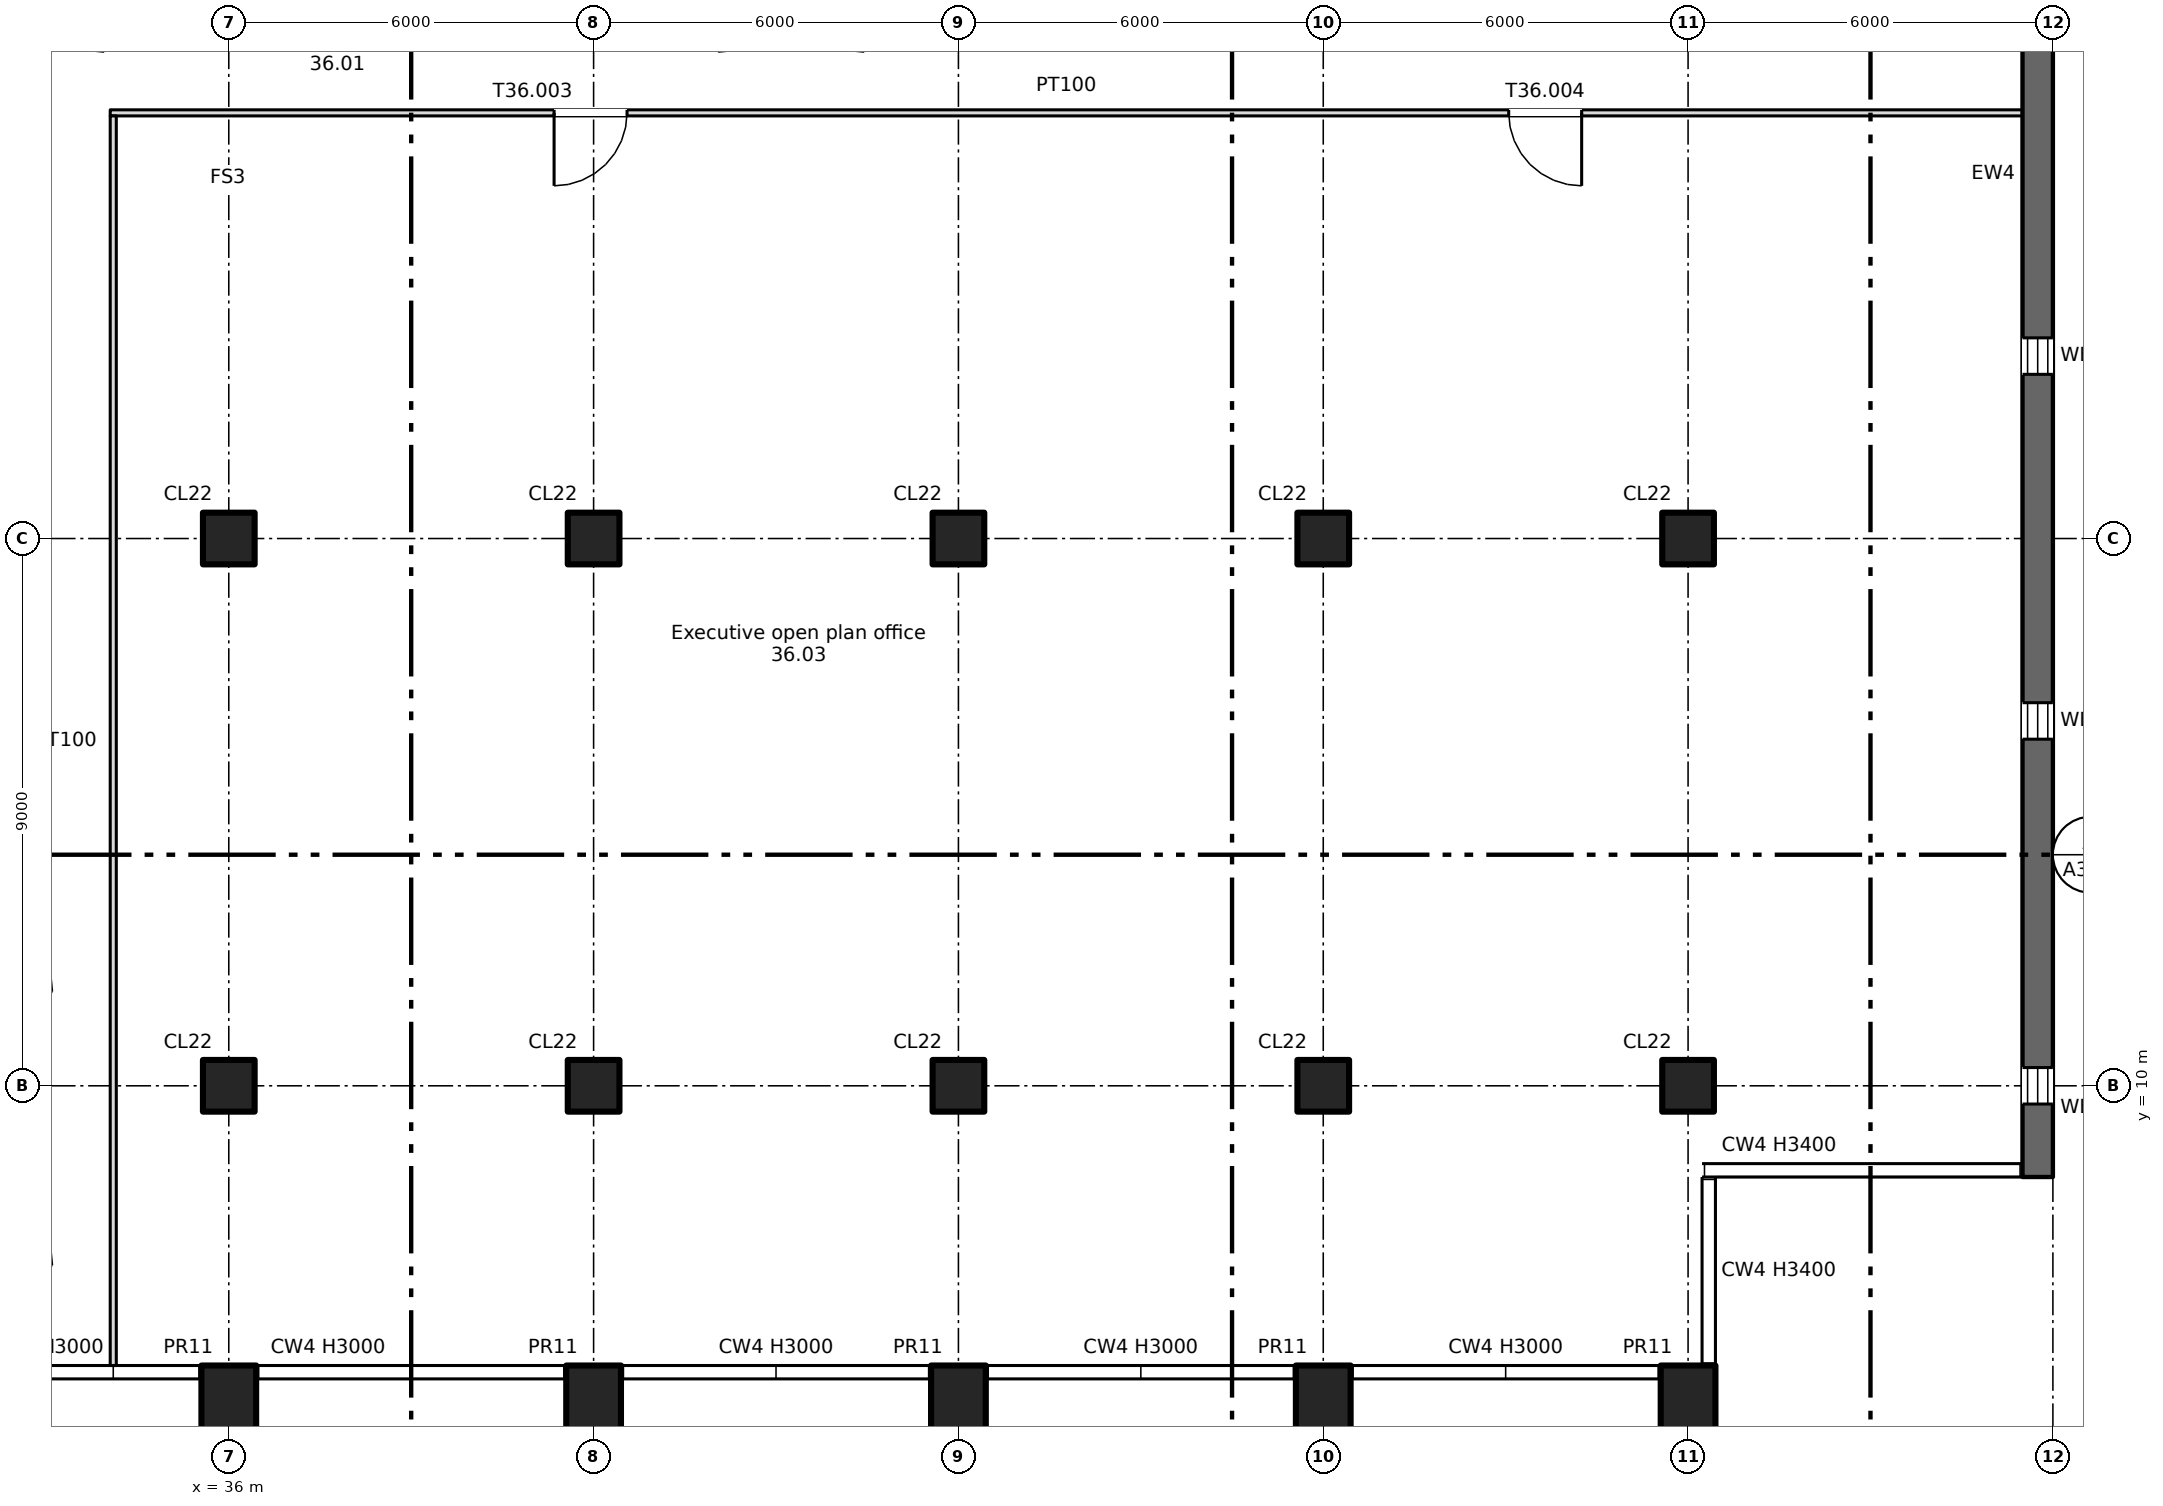
"""IFC4 building model, lengths in metres.
Left out: names, types, materials, properties, quantities, classifications, styles, units other than length and angle.
Written with IfcOpenShell. Run it as: python <this file> out.ifc"""

import sys

from ifc_helpers import new_model, si_unit, direction, frame, frame_2d, origin, origin_2d, place, context, subcontext, project, spatial, rectangle, extrude, element, fill, save


model = new_model("IFC4")
c1 = context("Model", 3, precision=1e-05, world=origin(), true_north=direction((0.0, 1.0)))
c2 = subcontext(c1, "Body", "Model", "MODEL_VIEW")
j1 = project(units=[si_unit("LENGTHUNIT", "METRE"), si_unit("PLANEANGLEUNIT", "RADIAN")], contexts=[c1])
p1 = place(None, origin())
s1 = spatial("IfcSite", under=j1, at=p1, CompositionType="ELEMENT")
p2 = place(p1, origin())
s2 = spatial("IfcBuilding", under=s1, at=p2, CompositionType="ELEMENT")
p3 = place(p2, frame((0.0, 0.0, 250.75)))
s3 = spatial("IfcBuildingStorey", under=s2, at=p3, CompositionType="ELEMENT", Elevation=250.75)
for number, where, z_axis, x_axis in (
    (1, (36.0, 4.7, -0.4), (0.0, 0.0, 1.0), (1.0, 0.0, 0.0)),
    (2, (42.0, 4.7, -0.4), (0.0, 0.0, 1.0), (1.0, 0.0, 0.0)),
    (3, (48.0, 4.7, -0.4), (0.0, 0.0, 1.0), (1.0, 0.0, 0.0)),
    (4, (54.0, 4.7, -0.4), (0.0, 0.0, 1.0), (1.0, 0.0, 0.0)),
    (5, (60.0, 4.7, -0.4), (0.0, 0.0, 1.0), (1.0, 0.0, 0.0)),
):
    element("IfcColumn", number, at=place(p3, frame(where, z_axis=z_axis, x_axis=x_axis)), inside=s3, PredefinedType="COLUMN", context=c2, shape_type="SweptSolid", body=[
        extrude(rectangle(XDim=0.9, YDim=1.4, at=origin_2d()), origin(), (0.0, 0.0, 1.0), 3.8),
    ])
for number, where, z_axis, x_axis in (
    (6, (36.0, 10.0, 0.0), (0.0, 0.0, 1.0), (1.0, 0.0, 0.0)),
    (7, (36.0, 19.0, 0.0), (0.0, 0.0, 1.0), (1.0, 0.0, 0.0)),
    (8, (42.0, 10.0, 0.0), (0.0, 0.0, 1.0), (1.0, 0.0, 0.0)),
    (9, (42.0, 19.0, 0.0), (0.0, 0.0, 1.0), (1.0, 0.0, 0.0)),
    (10, (48.0, 10.0, 0.0), (0.0, 0.0, 1.0), (1.0, 0.0, 0.0)),
    (11, (48.0, 19.0, 0.0), (0.0, 0.0, 1.0), (1.0, 0.0, 0.0)),
    (12, (54.0, 10.0, 0.0), (0.0, 0.0, 1.0), (1.0, 0.0, 0.0)),
    (13, (54.0, 19.0, 0.0), (0.0, 0.0, 1.0), (1.0, 0.0, 0.0)),
    (14, (60.0, 10.0, 0.0), (0.0, 0.0, 1.0), (1.0, 0.0, 0.0)),
    (15, (60.0, 19.0, 0.0), (0.0, 0.0, 1.0), (1.0, 0.0, 0.0)),
):
    element("IfcColumn", number, at=place(p3, frame(where, z_axis=z_axis, x_axis=x_axis)), inside=s3, PredefinedType="COLUMN", context=c2, shape_type="SweptSolid", body=[
        extrude(rectangle(XDim=0.85, YDim=0.85, at=origin_2d()), origin(), (0.0, 0.0, 1.0), 3.4),
    ])
p4 = place(p3, frame((65.75, 8.5, 0.0), z_axis=(0.0, 0.0, 1.0), x_axis=(0.0, 1.0, 0.0)))
e16 = element("IfcWall", 16, at=p4, inside=s3, PredefinedType="SHEAR", context=c2, shape_type="SweptSolid", body=[
    extrude(rectangle(XDim=33.0, YDim=0.5, at=frame_2d((16.5, 0.0))), origin(), (0.0, 0.0, 1.0), 3.4),
])
p5 = place(p4, frame((1.2, 0.0, 0.6)))
e17 = element("IfcOpeningElement", 17, at=p5, cuts=e16, PredefinedType="OPENING", context=c2, shape_type="SweptSolid", body=[
    extrude(rectangle(XDim=0.6, YDim=2.4, at=frame_2d((0.3, 1.2))), frame((0.0, 0.26, 0.0), z_axis=(0.0, -1.0, 0.0), x_axis=(1.0, 0.0, 0.0)), (0.0, 0.0, 1.0), 0.52),
])
p6 = place(p4, frame((7.2, 0.0, 0.6)))
e18 = element("IfcOpeningElement", 18, at=p6, cuts=e16, PredefinedType="OPENING", context=c2, shape_type="SweptSolid", body=[
    extrude(rectangle(XDim=0.6, YDim=2.4, at=frame_2d((0.3, 1.2))), frame((0.0, 0.26, 0.0), z_axis=(0.0, -1.0, 0.0), x_axis=(1.0, 0.0, 0.0)), (0.0, 0.0, 1.0), 0.52),
])
p7 = place(p4, frame((13.2, 0.0, 0.6)))
e19 = element("IfcOpeningElement", 19, at=p7, cuts=e16, PredefinedType="OPENING", context=c2, shape_type="SweptSolid", body=[
    extrude(rectangle(XDim=0.6, YDim=2.4, at=frame_2d((0.3, 1.2))), frame((0.0, 0.26, 0.0), z_axis=(0.0, -1.0, 0.0), x_axis=(1.0, 0.0, 0.0)), (0.0, 0.0, 1.0), 0.52),
])
p8 = place(p3, frame((34.05, 26.0, 0.0), z_axis=(0.0, 0.0, 1.0), x_axis=(1.0, 0.0, 0.0)))
e20 = element("IfcWall", 20, at=p8, inside=s3, PredefinedType="PARTITIONING", context=c2, shape_type="SweptSolid", body=[
    extrude(rectangle(XDim=31.45, YDim=0.1, at=frame_2d((15.725, 0.0))), origin(), (0.0, 0.0, 1.0), 3.4),
])
p9 = place(p8, frame((7.3, 0.0, 0.0)))
e21 = element("IfcOpeningElement", 21, at=p9, cuts=e20, PredefinedType="OPENING", context=c2, shape_type="SweptSolid", body=[
    extrude(rectangle(XDim=1.2, YDim=2.1, at=frame_2d((0.6, 1.05))), frame((0.0, 0.06, 0.0), z_axis=(0.0, -1.0, 0.0), x_axis=(1.0, 0.0, 0.0)), (0.0, 0.0, 1.0), 0.12),
])
p10 = place(p8, frame((23.0, 0.0, 0.0)))
e22 = element("IfcOpeningElement", 22, at=p10, cuts=e20, PredefinedType="OPENING", context=c2, shape_type="SweptSolid", body=[
    extrude(rectangle(XDim=1.2, YDim=2.1, at=frame_2d((0.6, 1.05))), frame((0.0, 0.06, 0.0), z_axis=(0.0, -1.0, 0.0), x_axis=(1.0, 0.0, 0.0)), (0.0, 0.0, 1.0), 0.12),
])
p11 = place(p3, frame((34.1, 5.4, 0.0), z_axis=(0.0, 0.0, 1.0), x_axis=(0.0, 1.0, 0.0)))
e23 = element("IfcWall", 23, at=p11, inside=s3, PredefinedType="PARTITIONING", context=c2, shape_type="SweptSolid", body=[
    extrude(rectangle(XDim=20.55, YDim=0.1, at=frame_2d((10.275, 0.0))), origin(), (0.0, 0.0, 1.0), 3.4),
])
p12 = place(p5, origin())
e24 = element("IfcWindow", 24, at=p12, inside=s3, PartitioningType="SINGLE_PANEL", PredefinedType="WINDOW", context=c2, shape_type="SweptSolid", body=[
    extrude(rectangle(XDim=0.6, YDim=2.4, at=frame_2d((0.3, 1.2))), frame((0.0, 0.03, 0.0), z_axis=(0.0, -1.0, 0.0), x_axis=(1.0, 0.0, 0.0)), (0.0, 0.0, 1.0), 0.06),
])
fill(e17, e24)
p13 = place(p6, origin())
e25 = element("IfcWindow", 25, at=p13, inside=s3, PartitioningType="SINGLE_PANEL", PredefinedType="WINDOW", context=c2, shape_type="SweptSolid", body=[
    extrude(rectangle(XDim=0.6, YDim=2.4, at=frame_2d((0.3, 1.2))), frame((0.0, 0.03, 0.0), z_axis=(0.0, -1.0, 0.0), x_axis=(1.0, 0.0, 0.0)), (0.0, 0.0, 1.0), 0.06),
])
fill(e18, e25)
p14 = place(p7, origin())
e26 = element("IfcWindow", 26, at=p14, inside=s3, PartitioningType="SINGLE_PANEL", PredefinedType="WINDOW", context=c2, shape_type="SweptSolid", body=[
    extrude(rectangle(XDim=0.6, YDim=2.4, at=frame_2d((0.3, 1.2))), frame((0.0, 0.03, 0.0), z_axis=(0.0, -1.0, 0.0), x_axis=(1.0, 0.0, 0.0)), (0.0, 0.0, 1.0), 0.06),
])
fill(e19, e26)
p15 = place(p9, origin())
e27 = element("IfcDoor", 27, at=p15, inside=s3, OperationType="SINGLE_SWING_LEFT", PredefinedType="DOOR", context=c2, shape_type="SweptSolid", body=[
    extrude(rectangle(XDim=1.2, YDim=2.1, at=frame_2d((0.6, 1.05))), frame((0.0, 0.025, 0.0), z_axis=(0.0, -1.0, 0.0), x_axis=(1.0, 0.0, 0.0)), (0.0, 0.0, 1.0), 0.05),
])
fill(e21, e27)
p16 = place(p10, origin())
e28 = element("IfcDoor", 28, at=p16, inside=s3, OperationType="SINGLE_SWING_RIGHT", PredefinedType="DOOR", context=c2, shape_type="SweptSolid", body=[
    extrude(rectangle(XDim=1.2, YDim=2.1, at=frame_2d((0.6, 1.05))), frame((0.0, 0.025, 0.0), z_axis=(0.0, -1.0, 0.0), x_axis=(1.0, 0.0, 0.0)), (0.0, 0.0, 1.0), 0.05),
])
fill(e22, e28)
save(model, sys.argv[1])
